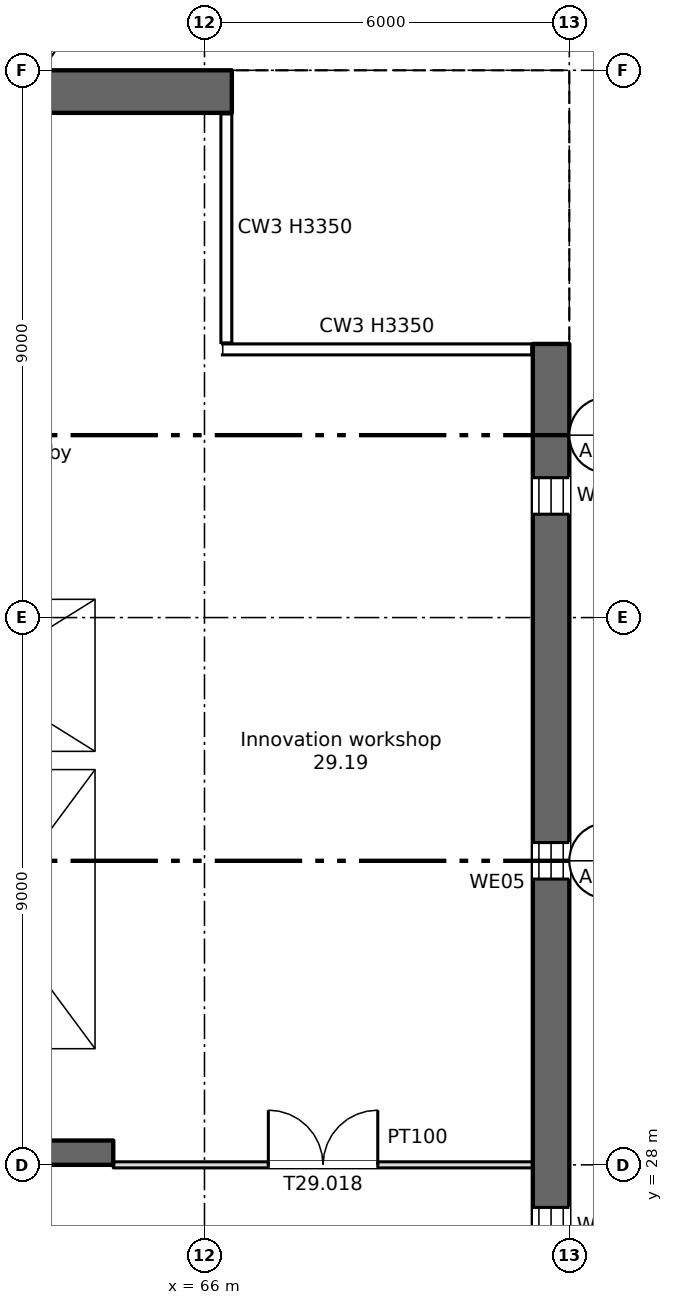
"""IFC4 building model, lengths in metres.
Left out: names, types, materials, properties, quantities, classifications, styles, units other than length and angle.
Written with IfcOpenShell. Run it as: python <this file> out.ifc"""

import sys

from ifc_helpers import new_model, si_unit, direction, frame, frame_2d, origin, place, context, subcontext, project, spatial, rectangle, extrude, element, fill, save


model = new_model("IFC4")
c1 = context("Model", 3, precision=1e-05, world=origin(), true_north=direction((0.0, 1.0)))
c2 = subcontext(c1, "Body", "Model", "MODEL_VIEW")
j1 = project(units=[si_unit("LENGTHUNIT", "METRE"), si_unit("PLANEANGLEUNIT", "RADIAN")], contexts=[c1])
p1 = place(None, origin())
s1 = spatial("IfcSite", under=j1, at=p1, CompositionType="ELEMENT")
p2 = place(p1, origin())
s2 = spatial("IfcBuilding", under=s1, at=p2, CompositionType="ELEMENT")
p3 = place(p2, frame((0.0, 0.0, 204.25)))
s3 = spatial("IfcBuildingStorey", under=s2, at=p3, CompositionType="ELEMENT", Elevation=204.25)
p4 = place(p3, frame((71.7, 7.5, 0.0), z_axis=(0.0, 0.0, 1.0), x_axis=(0.0, 1.0, 0.0)))
e1 = element("IfcWall", 1, at=p4, inside=s3, PredefinedType="SHEAR", context=c2, shape_type="SweptSolid", body=[
    extrude(rectangle(XDim=34.0, YDim=0.6, at=frame_2d((17.0, 0.0))), origin(), (0.0, 0.0, 1.0), 3.35),
])
p5 = place(p4, frame((1.2, 0.0, 0.6)))
e2 = element("IfcOpeningElement", 2, at=p5, cuts=e1, PredefinedType="OPENING", context=c2, shape_type="SweptSolid", body=[
    extrude(rectangle(XDim=0.6, YDim=2.4, at=frame_2d((0.3, 1.2))), frame((0.0, 0.31, 0.0), z_axis=(0.0, -1.0, 0.0), x_axis=(1.0, 0.0, 0.0)), (0.0, 0.0, 1.0), 0.62),
])
p6 = place(p4, frame((19.2, 0.0, 0.6)))
e3 = element("IfcOpeningElement", 3, at=p6, cuts=e1, PredefinedType="OPENING", context=c2, shape_type="SweptSolid", body=[
    extrude(rectangle(XDim=0.6, YDim=2.4, at=frame_2d((0.3, 1.2))), frame((0.0, 0.31, 0.0), z_axis=(0.0, -1.0, 0.0), x_axis=(1.0, 0.0, 0.0)), (0.0, 0.0, 1.0), 0.62),
])
p7 = place(p4, frame((25.2, 0.0, 0.6)))
e4 = element("IfcOpeningElement", 4, at=p7, cuts=e1, PredefinedType="OPENING", context=c2, shape_type="SweptSolid", body=[
    extrude(rectangle(XDim=0.6, YDim=2.4, at=frame_2d((0.3, 1.2))), frame((0.0, 0.31, 0.0), z_axis=(0.0, -1.0, 0.0), x_axis=(1.0, 0.0, 0.0)), (0.0, 0.0, 1.0), 0.62),
])
p8 = place(p4, frame((31.2, 0.0, 0.6)))
e5 = element("IfcOpeningElement", 5, at=p8, cuts=e1, PredefinedType="OPENING", context=c2, shape_type="SweptSolid", body=[
    extrude(rectangle(XDim=0.6, YDim=2.4, at=frame_2d((0.3, 1.2))), frame((0.0, 0.31, 0.0), z_axis=(0.0, -1.0, 0.0), x_axis=(1.0, 0.0, 0.0)), (0.0, 0.0, 1.0), 0.62),
])
p9 = place(p3, frame((11.55, 45.65, 0.0), z_axis=(0.0, 0.0, 1.0), x_axis=(1.0, 0.0, 0.0)))
e6 = element("IfcWall", 6, at=p9, inside=s3, PredefinedType="SHEAR", context=c2, shape_type="SweptSolid", body=[
    extrude(rectangle(XDim=54.9, YDim=0.7, at=frame_2d((27.45, 0.0))), origin(), (0.0, 0.0, 1.0), 3.35),
])
p10 = place(p3, frame((6.6, 28.2, 0.0), z_axis=(0.0, 0.0, 1.0), x_axis=(1.0, 0.0, 0.0)))
e7 = element("IfcWall", 7, at=p10, inside=s3, PredefinedType="SHEAR", context=c2, shape_type="SweptSolid", body=[
    extrude(rectangle(XDim=57.9, YDim=0.4, at=frame_2d((28.95, 0.0))), origin(), (0.0, 0.0, 1.0), 3.35),
])
p11 = place(p10, frame((12.663, 0.0, 0.0)))
e8 = element("IfcOpeningElement", 8, at=p11, cuts=e7, PredefinedType="OPENING", context=c2, shape_type="SweptSolid", body=[
    extrude(rectangle(XDim=0.9, YDim=2.1, at=frame_2d((0.45, 1.05))), frame((0.0, 0.21, 0.0), z_axis=(0.0, -1.0, 0.0), x_axis=(1.0, 0.0, 0.0)), (0.0, 0.0, 1.0), 0.42),
])
p12 = place(p10, frame((15.238, 0.0, 0.0)))
e9 = element("IfcOpeningElement", 9, at=p12, cuts=e7, PredefinedType="OPENING", context=c2, shape_type="SweptSolid", body=[
    extrude(rectangle(XDim=0.9, YDim=2.1, at=frame_2d((0.45, 1.05))), frame((0.0, 0.21, 0.0), z_axis=(0.0, -1.0, 0.0), x_axis=(1.0, 0.0, 0.0)), (0.0, 0.0, 1.0), 0.42),
])
p13 = place(p10, frame((49.95, 0.0, 0.0)))
e10 = element("IfcOpeningElement", 10, at=p13, cuts=e7, PredefinedType="OPENING", context=c2, shape_type="SweptSolid", body=[
    extrude(rectangle(XDim=0.9, YDim=2.1, at=frame_2d((0.45, 1.05))), frame((0.0, 0.21, 0.0), z_axis=(0.0, -1.0, 0.0), x_axis=(1.0, 0.0, 0.0)), (0.0, 0.0, 1.0), 0.42),
])
p14 = place(p10, frame((0.663, 0.0, 0.0)))
e11 = element("IfcOpeningElement", 11, at=p14, cuts=e7, PredefinedType="OPENING", context=c2, shape_type="SweptSolid", body=[
    extrude(rectangle(XDim=0.9, YDim=2.1, at=frame_2d((0.45, 1.05))), frame((0.0, 0.21, 0.0), z_axis=(0.0, -1.0, 0.0), x_axis=(1.0, 0.0, 0.0)), (0.0, 0.0, 1.0), 0.42),
])
p15 = place(p10, frame((2.238, 0.0, 0.0)))
e12 = element("IfcOpeningElement", 12, at=p15, cuts=e7, PredefinedType="OPENING", context=c2, shape_type="SweptSolid", body=[
    extrude(rectangle(XDim=0.9, YDim=2.1, at=frame_2d((0.45, 1.05))), frame((0.0, 0.21, 0.0), z_axis=(0.0, -1.0, 0.0), x_axis=(1.0, 0.0, 0.0)), (0.0, 0.0, 1.0), 0.42),
])
p16 = place(p10, frame((4.8, 0.0, 0.0)))
e13 = element("IfcOpeningElement", 13, at=p16, cuts=e7, PredefinedType="OPENING", context=c2, shape_type="SweptSolid", body=[
    extrude(rectangle(XDim=1.2, YDim=2.1, at=frame_2d((0.6, 1.05))), frame((0.0, 0.21, 0.0), z_axis=(0.0, -1.0, 0.0), x_axis=(1.0, 0.0, 0.0)), (0.0, 0.0, 1.0), 0.42),
])
p17 = place(p10, frame((31.8, 0.0, 0.0)))
e14 = element("IfcOpeningElement", 14, at=p17, cuts=e7, PredefinedType="OPENING", context=c2, shape_type="SweptSolid", body=[
    extrude(rectangle(XDim=1.2, YDim=2.1, at=frame_2d((0.6, 1.05))), frame((0.0, 0.21, 0.0), z_axis=(0.0, -1.0, 0.0), x_axis=(1.0, 0.0, 0.0)), (0.0, 0.0, 1.0), 0.42),
])
p18 = place(p10, frame((55.3, 0.0, 0.0)))
e15 = element("IfcOpeningElement", 15, at=p18, cuts=e7, PredefinedType="OPENING", context=c2, shape_type="SweptSolid", body=[
    extrude(rectangle(XDim=1.2, YDim=2.1, at=frame_2d((0.6, 1.05))), frame((0.0, 0.21, 0.0), z_axis=(0.0, -1.0, 0.0), x_axis=(1.0, 0.0, 0.0)), (0.0, 0.0, 1.0), 0.42),
])
p19 = place(p10, frame((21.8, 0.0, 0.0)))
e16 = element("IfcOpeningElement", 16, at=p19, cuts=e7, PredefinedType="OPENING", context=c2, shape_type="SweptSolid", body=[
    extrude(rectangle(XDim=1.2, YDim=2.1, at=frame_2d((0.6, 1.05))), frame((0.0, 0.21, 0.0), z_axis=(0.0, -1.0, 0.0), x_axis=(1.0, 0.0, 0.0)), (0.0, 0.0, 1.0), 0.42),
])
p20 = place(p10, frame((41.8, 0.0, 0.0)))
e17 = element("IfcOpeningElement", 17, at=p20, cuts=e7, PredefinedType="OPENING", context=c2, shape_type="SweptSolid", body=[
    extrude(rectangle(XDim=1.2, YDim=2.1, at=frame_2d((0.6, 1.05))), frame((0.0, 0.21, 0.0), z_axis=(0.0, -1.0, 0.0), x_axis=(1.0, 0.0, 0.0)), (0.0, 0.0, 1.0), 0.42),
])
p21 = place(p10, frame((24.95, 0.0, 0.0)))
e18 = element("IfcOpeningElement", 18, at=p21, cuts=e7, PredefinedType="OPENING", context=c2, shape_type="SweptSolid", body=[
    extrude(rectangle(XDim=2.4, YDim=2.1, at=frame_2d((1.2, 1.05))), frame((0.0, 0.21, 0.0), z_axis=(0.0, -1.0, 0.0), x_axis=(1.0, 0.0, 0.0)), (0.0, 0.0, 1.0), 0.42),
])
p22 = place(p10, frame((37.45, 0.0, 0.0)))
e19 = element("IfcOpeningElement", 19, at=p22, cuts=e7, PredefinedType="OPENING", context=c2, shape_type="SweptSolid", body=[
    extrude(rectangle(XDim=2.4, YDim=2.1, at=frame_2d((1.2, 1.05))), frame((0.0, 0.21, 0.0), z_axis=(0.0, -1.0, 0.0), x_axis=(1.0, 0.0, 0.0)), (0.0, 0.0, 1.0), 0.42),
])
p23 = place(p10, frame((8.1, 0.0, 0.0)))
e20 = element("IfcOpeningElement", 20, at=p23, cuts=e7, PredefinedType="OPENING", context=c2, shape_type="SweptSolid", body=[
    extrude(rectangle(XDim=2.4, YDim=2.1, at=frame_2d((1.2, 1.05))), frame((0.0, 0.21, 0.0), z_axis=(0.0, -1.0, 0.0), x_axis=(1.0, 0.0, 0.0)), (0.0, 0.0, 1.0), 0.42),
])
p24 = place(p10, frame((28.95, 0.0, 0.0)))
e21 = element("IfcOpeningElement", 21, at=p24, cuts=e7, PredefinedType="OPENING", context=c2, shape_type="SweptSolid", body=[
    extrude(rectangle(XDim=0.9, YDim=2.1, at=frame_2d((0.45, 1.05))), frame((0.0, 0.21, 0.0), z_axis=(0.0, -1.0, 0.0), x_axis=(1.0, 0.0, 0.0)), (0.0, 0.0, 1.0), 0.42),
])
p25 = place(p10, frame((34.95, 0.0, 0.0)))
e22 = element("IfcOpeningElement", 22, at=p25, cuts=e7, PredefinedType="OPENING", context=c2, shape_type="SweptSolid", body=[
    extrude(rectangle(XDim=0.9, YDim=2.1, at=frame_2d((0.45, 1.05))), frame((0.0, 0.21, 0.0), z_axis=(0.0, -1.0, 0.0), x_axis=(1.0, 0.0, 0.0)), (0.0, 0.0, 1.0), 0.42),
])
p26 = place(p3, frame((64.35, 34.8, 0.0), z_axis=(0.0, 0.0, 1.0), x_axis=(0.0, 1.0, 0.0)))
e23 = element("IfcWall", 23, at=p26, inside=s3, PredefinedType="SHEAR", context=c2, shape_type="SweptSolid", body=[
    extrude(rectangle(XDim=10.5, YDim=0.3, at=frame_2d((5.25, 0.0))), origin(), (0.0, 0.0, 1.0), 3.35),
])
p27 = place(p3, frame((64.35, 28.4, 0.0), z_axis=(0.0, 0.0, 1.0), x_axis=(0.0, 1.0, 0.0)))
e24 = element("IfcWall", 24, at=p27, inside=s3, PredefinedType="SHEAR", context=c2, shape_type="SweptSolid", body=[
    extrude(rectangle(XDim=6.1, YDim=0.3, at=frame_2d((3.05, 0.0))), origin(), (0.0, 0.0, 1.0), 3.35),
])
p28 = place(p3, frame((60.2, 34.65, 0.0), z_axis=(0.0, 0.0, 1.0), x_axis=(1.0, 0.0, 0.0)))
e25 = element("IfcWall", 25, at=p28, inside=s3, PredefinedType="SHEAR", context=c2, shape_type="SweptSolid", body=[
    extrude(rectangle(XDim=4.3, YDim=0.3, at=frame_2d((2.15, 0.0))), origin(), (0.0, 0.0, 1.0), 3.35),
])
p29 = place(p3, frame((60.2, 37.45, 0.0), z_axis=(0.0, 0.0, 1.0), x_axis=(1.0, 0.0, 0.0)))
e26 = element("IfcWall", 26, at=p29, inside=s3, PredefinedType="SHEAR", context=c2, shape_type="SweptSolid", body=[
    extrude(rectangle(XDim=4.0, YDim=0.3, at=frame_2d((2.0, 0.0))), origin(), (0.0, 0.0, 1.0), 3.35),
])
p30 = place(p29, frame((1.45, 0.0, 0.0)))
e27 = element("IfcOpeningElement", 27, at=p30, cuts=e26, PredefinedType="OPENING", context=c2, shape_type="SweptSolid", body=[
    extrude(rectangle(XDim=1.1, YDim=2.1, at=frame_2d((0.55, 1.05))), frame((0.0, 0.16, 0.0), z_axis=(0.0, -1.0, 0.0), x_axis=(1.0, 0.0, 0.0)), (0.0, 0.0, 1.0), 0.32),
])
p31 = place(p3, frame((64.5, 28.0, 0.0), z_axis=(0.0, 0.0, 1.0), x_axis=(1.0, 0.0, 0.0)))
e28 = element("IfcWall", 28, at=p31, inside=s3, PredefinedType="PARTITIONING", context=c2, shape_type="SweptSolid", body=[
    extrude(rectangle(XDim=6.9, YDim=0.1, at=frame_2d((3.45, 0.0))), origin(), (0.0, 0.0, 1.0), 3.35),
])
p32 = place(p31, frame((2.55, 0.0, 0.0)))
e29 = element("IfcOpeningElement", 29, at=p32, cuts=e28, PredefinedType="OPENING", context=c2, shape_type="SweptSolid", body=[
    extrude(rectangle(XDim=1.8, YDim=2.1, at=frame_2d((0.9, 1.05))), frame((0.0, 0.06, 0.0), z_axis=(0.0, -1.0, 0.0), x_axis=(1.0, 0.0, 0.0)), (0.0, 0.0, 1.0), 0.12),
])
p33 = place(p6, origin())
e30 = element("IfcWindow", 30, at=p33, inside=s3, PartitioningType="SINGLE_PANEL", PredefinedType="WINDOW", context=c2, shape_type="SweptSolid", body=[
    extrude(rectangle(XDim=0.6, YDim=2.4, at=frame_2d((0.3, 1.2))), frame((0.0, 0.03, 0.0), z_axis=(0.0, -1.0, 0.0), x_axis=(1.0, 0.0, 0.0)), (0.0, 0.0, 1.0), 0.06),
])
fill(e3, e30)
p34 = place(p7, origin())
e31 = element("IfcWindow", 31, at=p34, inside=s3, PartitioningType="SINGLE_PANEL", PredefinedType="WINDOW", context=c2, shape_type="SweptSolid", body=[
    extrude(rectangle(XDim=0.6, YDim=2.4, at=frame_2d((0.3, 1.2))), frame((0.0, 0.03, 0.0), z_axis=(0.0, -1.0, 0.0), x_axis=(1.0, 0.0, 0.0)), (0.0, 0.0, 1.0), 0.06),
])
fill(e4, e31)
p35 = place(p8, origin())
e32 = element("IfcWindow", 32, at=p35, inside=s3, PartitioningType="SINGLE_PANEL", PredefinedType="WINDOW", context=c2, shape_type="SweptSolid", body=[
    extrude(rectangle(XDim=0.6, YDim=2.4, at=frame_2d((0.3, 1.2))), frame((0.0, 0.03, 0.0), z_axis=(0.0, -1.0, 0.0), x_axis=(1.0, 0.0, 0.0)), (0.0, 0.0, 1.0), 0.06),
])
fill(e5, e32)
p36 = place(p32, origin())
e33 = element("IfcDoor", 33, at=p36, inside=s3, OperationType="DOUBLE_DOOR_SINGLE_SWING", PredefinedType="DOOR", context=c2, shape_type="SweptSolid", body=[
    extrude(rectangle(XDim=1.8, YDim=2.1, at=frame_2d((0.9, 1.05))), frame((0.0, 0.025, 0.0), z_axis=(0.0, -1.0, 0.0), x_axis=(1.0, 0.0, 0.0)), (0.0, 0.0, 1.0), 0.05),
])
fill(e29, e33)
save(model, sys.argv[1])
